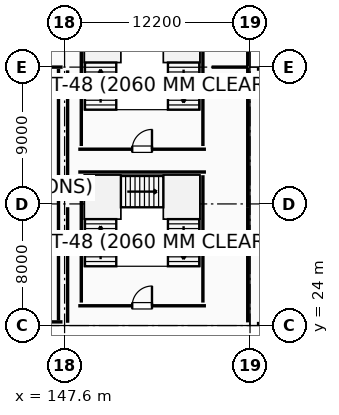
"""IFC4 building model, lengths in metres.
Left out: names, types, materials, properties, quantities, classifications, styles, units other than length and angle.
Written with IfcOpenShell. Run it as: python <this file> out.ifc"""

import sys

from ifc_helpers import new_model, si_unit, direction, frame, frame_2d, origin, origin_2d, place, context, subcontext, project, spatial, rectangle, i_section, extrude, element, fill, save


model = new_model("IFC4")
c1 = context("Model", 3, precision=1e-05, world=origin(), true_north=direction((0.0, 1.0)))
c2 = subcontext(c1, "Body", "Model", "MODEL_VIEW")
j1 = project(units=[si_unit("LENGTHUNIT", "METRE"), si_unit("PLANEANGLEUNIT", "RADIAN")], contexts=[c1])
p1 = place(None, origin())
s1 = spatial("IfcSite", under=j1, at=p1, CompositionType="ELEMENT")
p2 = place(p1, origin())
s2 = spatial("IfcBuilding", under=s1, at=p2, CompositionType="ELEMENT")
p3 = place(p2, frame((0.0, 0.0, 5.4)))
s3 = spatial("IfcBuildingStorey", under=s2, at=p3, CompositionType="ELEMENT", Elevation=5.4)
for number, where, z_axis, x_axis in (
    (1, (147.6, 24.0, 0.0), (0.0, 0.0, 1.0), (1.0, 0.0, 0.0)),
    (2, (147.6, 32.0, 0.0), (0.0, 0.0, 1.0), (1.0, 0.0, 0.0)),
    (3, (147.6, 41.0, 0.0), (0.0, 0.0, 1.0), (1.0, 0.0, 0.0)),
    (4, (159.8, 24.0, 0.0), (0.0, 0.0, 1.0), (1.0, 0.0, 0.0)),
    (5, (159.8, 32.0, 0.0), (0.0, 0.0, 1.0), (1.0, 0.0, 0.0)),
    (6, (159.8, 41.0, 0.0), (0.0, 0.0, 1.0), (1.0, 0.0, 0.0)),
):
    element("IfcColumn", number, at=place(p3, frame(where, z_axis=z_axis, x_axis=x_axis)), inside=s3, PredefinedType="COLUMN", context=c2, shape_type="SweptSolid", body=[
        extrude(i_section(OverallWidth=0.25, OverallDepth=0.4, WebThickness=0.01, FlangeThickness=0.013, FilletRadius=0.014, at=origin_2d()), origin(), (0.0, 0.0, 1.0), 4.8),
    ])
for number, where, z_axis, x_axis in (
    (7, (151.22, 31.08, 0.0), (0.0, 0.0, 1.0), (1.0, 0.0, 0.0)),
    (8, (154.18, 31.08, 0.0), (0.0, 0.0, 1.0), (1.0, 0.0, 0.0)),
    (9, (151.22, 41.38, 0.0), (0.0, 0.0, 1.0), (1.0, 0.0, 0.0)),
    (10, (154.18, 41.38, 0.0), (0.0, 0.0, 1.0), (1.0, 0.0, 0.0)),
):
    element("IfcColumn", number, at=place(p3, frame(where, z_axis=z_axis, x_axis=x_axis)), inside=s3, PredefinedType="COLUMN", context=c2, shape_type="SweptSolid", body=[
        extrude(i_section(OverallWidth=0.25, OverallDepth=0.35, WebThickness=0.01, FlangeThickness=0.012, FilletRadius=0.012, at=origin_2d()), origin(), (0.0, 0.0, 1.0), 4.8),
    ])
p4 = place(p3, frame((159.65, 49.792, 0.0), z_axis=(0.0, 0.0, 1.0), x_axis=(0.0, -1.0, 0.0)))
e11 = element("IfcWall", 11, at=p4, inside=s3, PredefinedType="ELEMENTEDWALL", context=c2, shape_type="SweptSolid", body=[
    extrude(rectangle(XDim=8.74, YDim=0.26, at=frame_2d((4.37, 0.0))), origin(), (0.0, 0.0, 1.0), 3.975),
])
p5 = place(p4, frame((3.667, 0.0, 0.95)))
e12 = element("IfcOpeningElement", 12, at=p5, cuts=e11, PredefinedType="OPENING", context=c2, shape_type="SweptSolid", body=[
    extrude(rectangle(XDim=1.25, YDim=1.5, at=frame_2d((0.625, 0.75))), frame((0.0, 0.14, 0.0), z_axis=(0.0, -1.0, 0.0), x_axis=(1.0, 0.0, 0.0)), (0.0, 0.0, 1.0), 0.28),
])
p6 = place(p3, frame((159.65, 40.948, 0.0), z_axis=(0.0, 0.0, 1.0), x_axis=(0.0, -1.0, 0.0)))
e13 = element("IfcWall", 13, at=p6, inside=s3, PredefinedType="ELEMENTEDWALL", context=c2, shape_type="SweptSolid", body=[
    extrude(rectangle(XDim=9.156, YDim=0.26, at=frame_2d((4.578, 0.0))), origin(), (0.0, 0.0, 1.0), 3.925),
])
p7 = place(p6, frame((3.823, 0.0, 0.95)))
e14 = element("IfcOpeningElement", 14, at=p7, cuts=e13, PredefinedType="OPENING", context=c2, shape_type="SweptSolid", body=[
    extrude(rectangle(XDim=1.25, YDim=1.8, at=frame_2d((0.625, 0.9))), frame((0.0, 0.14, 0.0), z_axis=(0.0, -1.0, 0.0), x_axis=(1.0, 0.0, 0.0)), (0.0, 0.0, 1.0), 0.28),
])
p8 = place(p3, frame((159.65, 31.792, 0.0), z_axis=(0.0, 0.0, 1.0), x_axis=(0.0, -1.0, 0.0)))
e15 = element("IfcWall", 15, at=p8, inside=s3, PredefinedType="ELEMENTEDWALL", context=c2, shape_type="SweptSolid", body=[
    extrude(rectangle(XDim=7.584, YDim=0.26, at=frame_2d((3.792, 0.0))), origin(), (0.0, 0.0, 1.0), 4.225),
])
p9 = place(p8, frame((3.167, 0.0, 0.95)))
e16 = element("IfcOpeningElement", 16, at=p9, cuts=e15, PredefinedType="OPENING", context=c2, shape_type="SweptSolid", body=[
    extrude(rectangle(XDim=1.25, YDim=2.1, at=frame_2d((0.625, 1.05))), frame((0.0, 0.14, 0.0), z_axis=(0.0, -1.0, 0.0), x_axis=(1.0, 0.0, 0.0)), (0.0, 0.0, 1.0), 0.28),
])
p10 = place(p3, frame((147.465, 24.24, 0.0), z_axis=(0.0, 0.0, 1.0), x_axis=(-1.0, 0.0, 0.0)))
e17 = element("IfcWall", 17, at=p10, inside=s3, PredefinedType="PARAPET", context=c2, shape_type="SweptSolid", body=[
    extrude(rectangle(XDim=11.68, YDim=0.18, at=frame_2d((5.84, 0.0))), origin(), (0.0, 0.0, 1.0), 0.88),
])
for number, where, z_axis, x_axis in (
    (18, (160.25, 40.87, 0.0), (0.0, 0.0, 1.0), (1.0, 0.0, 0.0)),
    (19, (171.85, 24.13, 0.0), (0.0, 0.0, 1.0), (-1.0, 0.0, 0.0)),
):
    element("IfcWall", number, at=place(p3, frame(where, z_axis=z_axis, x_axis=x_axis)), inside=s3, PredefinedType="PARAPET", context=c2, shape_type="SweptSolid", body=[
        extrude(rectangle(XDim=11.6, YDim=0.22, at=frame_2d((5.8, 0.0))), origin(), (0.0, 0.0, 1.0), 1.15),
    ])
p11 = place(p3, frame((148.5, 25.3, 0.0), z_axis=(0.0, 0.0, 1.0), x_axis=(1.0, 0.0, 0.0)))
e20 = element("IfcWall", 20, at=p11, inside=s3, PredefinedType="SHEAR", context=c2, shape_type="SweptSolid", body=[
    extrude(rectangle(XDim=8.4, YDim=0.4, at=frame_2d((4.2, 0.0))), origin(), (0.0, 0.0, 1.0), 4.54),
])
p12 = place(p11, frame((3.55, 0.0, 0.0)))
e21 = element("IfcOpeningElement", 21, at=p12, cuts=e20, PredefinedType="OPENING", context=c2, shape_type="SweptSolid", body=[
    extrude(rectangle(XDim=1.3, YDim=2.15, at=frame_2d((0.65, 1.075))), frame((0.0, 0.21, 0.0), z_axis=(0.0, -1.0, 0.0), x_axis=(1.0, 0.0, 0.0)), (0.0, 0.0, 1.0), 0.42),
])
p13 = place(p3, frame((156.9, 34.1, 0.0), z_axis=(0.0, 0.0, 1.0), x_axis=(-1.0, 0.0, 0.0)))
e22 = element("IfcWall", 22, at=p13, inside=s3, PredefinedType="SHEAR", context=c2, shape_type="SweptSolid", body=[
    extrude(rectangle(XDim=8.4, YDim=0.4, at=frame_2d((4.2, 0.0))), origin(), (0.0, 0.0, 1.0), 4.54),
])
for number, where, z_axis, x_axis in (
    (23, (156.7, 25.51, 0.0), (0.0, 0.0, 1.0), (0.0, 1.0, 0.0)),
    (24, (148.7, 33.89, 0.0), (0.0, 0.0, 1.0), (0.0, -1.0, 0.0)),
):
    element("IfcWall", number, at=place(p3, frame(where, z_axis=z_axis, x_axis=x_axis)), inside=s3, PredefinedType="SHEAR", context=c2, shape_type="SweptSolid", body=[
        extrude(rectangle(XDim=8.38, YDim=0.4, at=frame_2d((4.19, 0.0))), origin(), (0.0, 0.0, 1.0), 4.54),
    ])
p14 = place(p3, frame((148.5, 35.6, 0.0), z_axis=(0.0, 0.0, 1.0), x_axis=(1.0, 0.0, 0.0)))
e25 = element("IfcWall", 25, at=p14, inside=s3, PredefinedType="SHEAR", context=c2, shape_type="SweptSolid", body=[
    extrude(rectangle(XDim=8.4, YDim=0.4, at=frame_2d((4.2, 0.0))), origin(), (0.0, 0.0, 1.0), 4.54),
])
p15 = place(p14, frame((3.55, 0.0, 0.0)))
e26 = element("IfcOpeningElement", 26, at=p15, cuts=e25, PredefinedType="OPENING", context=c2, shape_type="SweptSolid", body=[
    extrude(rectangle(XDim=1.3, YDim=2.15, at=frame_2d((0.65, 1.075))), frame((0.0, 0.21, 0.0), z_axis=(0.0, -1.0, 0.0), x_axis=(1.0, 0.0, 0.0)), (0.0, 0.0, 1.0), 0.42),
])
for number, where, z_axis, x_axis in (
    (27, (156.7, 35.81, 0.0), (0.0, 0.0, 1.0), (0.0, 1.0, 0.0)),
    (28, (148.7, 44.19, 0.0), (0.0, 0.0, 1.0), (0.0, -1.0, 0.0)),
):
    element("IfcWall", number, at=place(p3, frame(where, z_axis=z_axis, x_axis=x_axis)), inside=s3, PredefinedType="SHEAR", context=c2, shape_type="SweptSolid", body=[
        extrude(rectangle(XDim=8.38, YDim=0.4, at=frame_2d((4.19, 0.0))), origin(), (0.0, 0.0, 1.0), 4.54),
    ])
p16 = place(p3, frame((135.79, 41.0, 0.0), z_axis=(0.0, 0.0, 1.0), x_axis=(1.0, 0.0, 0.0)))
e29 = element("IfcWall", 29, at=p16, inside=s3, PredefinedType="PARTITIONING", context=c2, shape_type="SweptSolid", body=[
    extrude(rectangle(XDim=11.681, YDim=0.2, at=frame_2d((5.84, 0.0))), origin(), (0.0, 0.0, 1.0), 3.89),
])
p17 = place(p16, frame((5.12, 0.0, 0.0)))
e30 = element("IfcOpeningElement", 30, at=p17, cuts=e29, PredefinedType="OPENING", context=c2, shape_type="SweptSolid", body=[
    extrude(rectangle(XDim=1.05, YDim=2.15, at=frame_2d((0.525, 1.075))), frame((0.0, 0.11, 0.0), z_axis=(0.0, -1.0, 0.0), x_axis=(1.0, 0.0, 0.0)), (0.0, 0.0, 1.0), 0.22),
])
p18 = place(p3, frame((147.2, 40.88, 0.0), z_axis=(0.0, 0.0, 1.0), x_axis=(0.0, -1.0, 0.0)))
e31 = element("IfcWall", 31, at=p18, inside=s3, PredefinedType="PARTITIONING", context=c2, shape_type="SweptSolid", body=[
    extrude(rectangle(XDim=16.546, YDim=0.2, at=frame_2d((8.273, 0.0))), origin(), (0.0, 0.0, 1.0), 3.89),
])
p19 = place(p3, frame((147.8, 24.182, 0.0), z_axis=(0.0, 0.0, 1.0), x_axis=(0.0, 1.0, 0.0)))
e32 = element("IfcWall", 32, at=p19, inside=s3, PredefinedType="MOVABLE", context=c2, shape_type="SweptSolid", body=[
    extrude(rectangle(XDim=7.603, YDim=0.11, at=frame_2d((3.802, 0.0))), origin(), (0.0, 0.0, 1.0), 3.89),
])
p20 = place(p3, frame((147.8, 32.215, 0.0), z_axis=(0.0, 0.0, 1.0), x_axis=(0.0, 1.0, 0.0)))
e33 = element("IfcWall", 33, at=p20, inside=s3, PredefinedType="MOVABLE", context=c2, shape_type="SweptSolid", body=[
    extrude(rectangle(XDim=8.57, YDim=0.11, at=frame_2d((4.285, 0.0))), origin(), (0.0, 0.0, 1.0), 3.89),
])
p21 = place(p3, frame((157.275, 41.0, 0.0), z_axis=(0.0, 0.0, 1.0), x_axis=(1.0, 0.0, 0.0)))
e34 = element("IfcWall", 34, at=p21, inside=s3, PredefinedType="MOVABLE", context=c2, shape_type="SweptSolid", body=[
    extrude(rectangle(XDim=2.396, YDim=0.11, at=frame_2d((1.198, 0.0))), origin(), (0.0, 0.0, 1.0), 4.53),
])
p22 = place(p7, origin())
e35 = element("IfcWindow", 35, at=p22, inside=s3, PartitioningType="SINGLE_PANEL", PredefinedType="WINDOW", context=c2, shape_type="SweptSolid", body=[
    extrude(rectangle(XDim=1.25, YDim=1.8, at=frame_2d((0.625, 0.9))), frame((0.0, 0.03, 0.0), z_axis=(0.0, -1.0, 0.0), x_axis=(1.0, 0.0, 0.0)), (0.0, 0.0, 1.0), 0.06),
])
fill(e14, e35)
p23 = place(p9, origin())
e36 = element("IfcWindow", 36, at=p23, inside=s3, PartitioningType="SINGLE_PANEL", PredefinedType="WINDOW", context=c2, shape_type="SweptSolid", body=[
    extrude(rectangle(XDim=1.25, YDim=2.1, at=frame_2d((0.625, 1.05))), frame((0.0, 0.03, 0.0), z_axis=(0.0, -1.0, 0.0), x_axis=(1.0, 0.0, 0.0)), (0.0, 0.0, 1.0), 0.06),
])
fill(e16, e36)
p24 = place(p12, origin())
e37 = element("IfcDoor", 37, at=p24, inside=s3, OperationType="SINGLE_SWING_RIGHT", PredefinedType="DOOR", context=c2, shape_type="SweptSolid", body=[
    extrude(rectangle(XDim=1.3, YDim=2.15, at=frame_2d((0.65, 1.075))), frame((0.0, 0.025, 0.0), z_axis=(0.0, -1.0, 0.0), x_axis=(1.0, 0.0, 0.0)), (0.0, 0.0, 1.0), 0.05),
])
fill(e21, e37)
p25 = place(p15, origin())
e38 = element("IfcDoor", 38, at=p25, inside=s3, OperationType="SINGLE_SWING_RIGHT", PredefinedType="DOOR", context=c2, shape_type="SweptSolid", body=[
    extrude(rectangle(XDim=1.3, YDim=2.15, at=frame_2d((0.65, 1.075))), frame((0.0, 0.025, 0.0), z_axis=(0.0, -1.0, 0.0), x_axis=(1.0, 0.0, 0.0)), (0.0, 0.0, 1.0), 0.05),
])
fill(e26, e38)
save(model, sys.argv[1])
